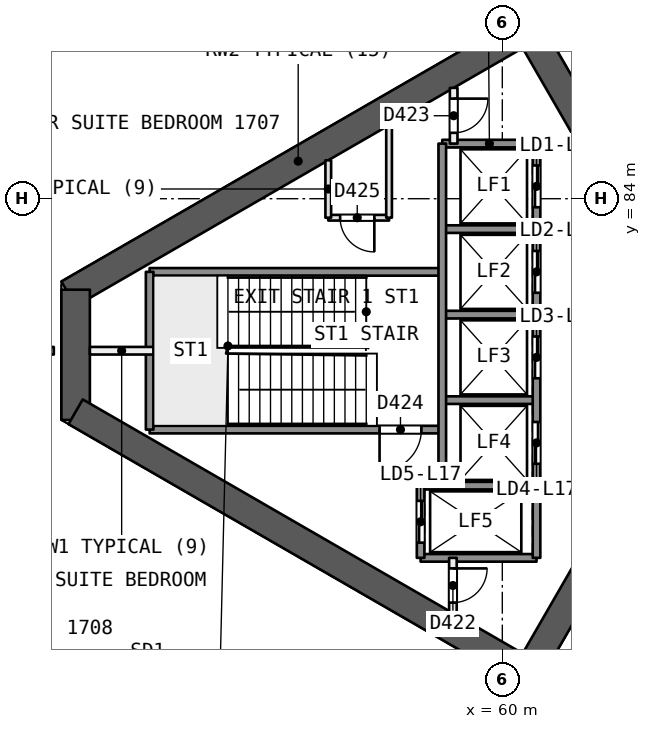
"""IFC4 building model, lengths in metres.
Left out: names, types, materials, properties, quantities, classifications, styles, units other than length and angle.
Written with IfcOpenShell. Run it as: python <this file> out.ifc"""

import sys

from ifc_helpers import new_model, si_unit, direction, frame, frame_2d, origin, place, context, subcontext, project, spatial, rectangle, extrude, element, fill, save


model = new_model("IFC4")
c1 = context("Model", 3, precision=1e-05, world=origin(), true_north=direction((0.0, 1.0)))
c2 = subcontext(c1, "Body", "Model", "MODEL_VIEW")
j1 = project(units=[si_unit("LENGTHUNIT", "METRE"), si_unit("PLANEANGLEUNIT", "RADIAN")], contexts=[c1])
p1 = place(None, origin())
s1 = spatial("IfcSite", under=j1, at=p1, CompositionType="ELEMENT")
p2 = place(p1, origin())
s2 = spatial("IfcBuilding", under=s1, at=p2, CompositionType="ELEMENT")
p3 = place(p2, frame((0.0, 0.0, 75.8)))
s3 = spatial("IfcBuildingStorey", under=s2, at=p3, CompositionType="ELEMENT", Elevation=75.8)
p4 = place(p3, frame((65.567, 80.0, 0.0), z_axis=(0.0, 0.0, 1.0), x_axis=(-0.499988615364, 0.866031976607, 0.0)))
e1 = element("IfcWall", 1, at=p4, inside=s3, PredefinedType="SHEAR", context=c2, shape_type="SweptSolid", body=[
    extrude(rectangle(XDim=10.163, YDim=0.75, at=frame_2d((5.082, 0.0))), origin(), (0.0, 0.0, 1.0), 3.7),
])
p5 = place(p4, frame((0.733, 0.0, 0.0)))
e2 = element("IfcOpeningElement", 2, at=p5, cuts=e1, PredefinedType="OPENING", context=c2, shape_type="SweptSolid", body=[
    extrude(rectangle(XDim=1.2, YDim=2.1, at=frame_2d((0.6, 1.05))), frame((0.0, 0.385, 0.0), z_axis=(0.0, -1.0, 0.0), x_axis=(1.0, 0.0, 0.0)), (0.0, 0.0, 1.0), 0.771),
])
p6 = place(p3, frame((60.673, 88.477, 0.0), z_axis=(0.0, 0.0, 1.0), x_axis=(-0.8660248072, -0.500001033313, 0.0)))
e3 = element("IfcWall", 3, at=p6, inside=s3, PredefinedType="SHEAR", context=c2, shape_type="SweptSolid", body=[
    extrude(rectangle(XDim=13.958, YDim=0.75, at=frame_2d((6.979, 0.0))), origin(), (0.0, 0.0, 1.0), 3.7),
])
p7 = place(p3, frame((48.772, 81.606, 0.0), z_axis=(0.0, 0.0, 1.0), x_axis=(0.0, -1.0, 0.0)))
e4 = element("IfcWall", 4, at=p7, inside=s3, PredefinedType="SHEAR", context=c2, shape_type="SweptSolid", body=[
    extrude(rectangle(XDim=3.429, YDim=0.75, at=frame_2d((1.714, 0.0))), origin(), (0.0, 0.0, 1.0), 3.7),
])
p8 = place(p3, frame((48.772, 78.394, 0.0), z_axis=(0.0, 0.0, 1.0), x_axis=(0.866028339916, -0.499994914436, 0.0)))
e5 = element("IfcWall", 5, at=p8, inside=s3, PredefinedType="SHEAR", context=c2, shape_type="SweptSolid", body=[
    extrude(rectangle(XDim=14.117, YDim=0.75, at=frame_2d((7.059, 0.0))), origin(), (0.0, 0.0, 1.0), 3.7),
])
p9 = place(p3, frame((60.673, 71.523, 0.0), z_axis=(0.0, 0.0, 1.0), x_axis=(0.499997052475, 0.866027105532, 0.0)))
e6 = element("IfcWall", 6, at=p9, inside=s3, PredefinedType="SHEAR", context=c2, shape_type="SweptSolid", body=[
    extrude(rectangle(XDim=10.005, YDim=0.75, at=frame_2d((5.002, 0.0))), origin(), (0.0, 0.0, 1.0), 3.7),
])
p10 = place(p9, frame((7.855, 0.0, 0.0)))
e7 = element("IfcOpeningElement", 7, at=p10, cuts=e6, PredefinedType="OPENING", context=c2, shape_type="SweptSolid", body=[
    extrude(rectangle(XDim=1.2, YDim=2.1, at=frame_2d((0.6, 1.05))), frame((0.0, 0.385, 0.0), z_axis=(0.0, -1.0, 0.0), x_axis=(1.0, 0.0, 0.0)), (0.0, 0.0, 1.0), 0.771),
])
p11 = place(p3, frame((61.547, 95.819, 0.0), z_axis=(0.0, 0.0, 1.0), x_axis=(0.499993103482, -0.866029385454, 0.0)))
e8 = element("IfcWall", 8, at=p11, inside=s3, PredefinedType="PARTITIONING", context=c2, shape_type="SweptSolid", body=[
    extrude(rectangle(XDim=13.326, YDim=0.2, at=frame_2d((6.663, 0.0))), origin(), (0.0, 0.0, 1.0), 3.2),
])
p12 = place(p3, frame((39.241, 80.0, 0.0), z_axis=(0.0, 0.0, 1.0), x_axis=(1.0, 0.0, 0.0)))
e9 = element("IfcWall", 9, at=p12, inside=s3, PredefinedType="PARTITIONING", context=c2, shape_type="SweptSolid", body=[
    extrude(rectangle(XDim=8.957, YDim=0.2, at=frame_2d((4.478, 0.0))), origin(), (0.0, 0.0, 1.0), 3.2),
])
p13 = place(p3, frame((39.093, 83.027, 0.0), z_axis=(0.0, 0.0, 1.0), x_axis=(0.866024586246, 0.500001416016, 0.0)))
e10 = element("IfcWall", 10, at=p13, inside=s3, PredefinedType="SOLIDWALL", context=c2, shape_type="SweptSolid", body=[
    extrude(rectangle(XDim=59.166, YDim=0.3, at=frame_2d((29.583, 0.0))), origin(), (0.0, 0.0, 1.0), 3.2),
])
p14 = place(p13, frame((27.292, 0.0, 0.0)))
e11 = element("IfcOpeningElement", 11, at=p14, cuts=e10, PredefinedType="OPENING", context=c2, shape_type="SweptSolid", body=[
    extrude(rectangle(XDim=2.4, YDim=2.4, at=frame_2d((1.2, 1.2))), frame((0.0, 0.161, 0.0), z_axis=(0.0, -1.0, 0.0), x_axis=(1.0, 0.0, 0.0)), (0.0, 0.0, 1.0), 0.321),
])
p15 = place(p13, frame((22.615, 0.0, 0.0)))
e12 = element("IfcOpeningElement", 12, at=p15, cuts=e10, PredefinedType="OPENING", context=c2, shape_type="SweptSolid", body=[
    extrude(rectangle(XDim=2.4, YDim=2.4, at=frame_2d((1.2, 1.2))), frame((0.0, 0.161, 0.0), z_axis=(0.0, -1.0, 0.0), x_axis=(1.0, 0.0, 0.0)), (0.0, 0.0, 1.0), 0.321),
])
p16 = place(p13, frame((10.88, 0.0, 0.0)))
e13 = element("IfcOpeningElement", 13, at=p16, cuts=e10, PredefinedType="OPENING", context=c2, shape_type="SweptSolid", body=[
    extrude(rectangle(XDim=2.4, YDim=2.4, at=frame_2d((1.2, 1.2))), frame((0.0, 0.161, 0.0), z_axis=(0.0, -1.0, 0.0), x_axis=(1.0, 0.0, 0.0)), (0.0, 0.0, 1.0), 0.321),
])
p17 = place(p13, frame((43.998, 0.0, 0.0)))
e14 = element("IfcOpeningElement", 14, at=p17, cuts=e10, PredefinedType="OPENING", context=c2, shape_type="SweptSolid", body=[
    extrude(rectangle(XDim=2.4, YDim=2.4, at=frame_2d((1.2, 1.2))), frame((0.0, 0.161, 0.0), z_axis=(0.0, -1.0, 0.0), x_axis=(1.0, 0.0, 0.0)), (0.0, 0.0, 1.0), 0.321),
])
p18 = place(p3, frame((90.332, 47.39, 0.0), z_axis=(0.0, 0.0, 1.0), x_axis=(-0.866024586246, 0.500001416016, 0.0)))
e15 = element("IfcWall", 15, at=p18, inside=s3, PredefinedType="SOLIDWALL", context=c2, shape_type="SweptSolid", body=[
    extrude(rectangle(XDim=59.166, YDim=0.3, at=frame_2d((29.583, 0.0))), origin(), (0.0, 0.0, 1.0), 3.2),
])
p19 = place(p18, frame((28.695, 0.0, 0.0)))
e16 = element("IfcOpeningElement", 16, at=p19, cuts=e15, PredefinedType="OPENING", context=c2, shape_type="SweptSolid", body=[
    extrude(rectangle(XDim=2.4, YDim=2.4, at=frame_2d((1.2, 1.2))), frame((0.0, 0.161, 0.0), z_axis=(0.0, -1.0, 0.0), x_axis=(1.0, 0.0, 0.0)), (0.0, 0.0, 1.0), 0.321),
])
p20 = place(p18, frame((33.372, 0.0, 0.0)))
e17 = element("IfcOpeningElement", 17, at=p20, cuts=e15, PredefinedType="OPENING", context=c2, shape_type="SweptSolid", body=[
    extrude(rectangle(XDim=2.4, YDim=2.4, at=frame_2d((1.2, 1.2))), frame((0.0, 0.161, 0.0), z_axis=(0.0, -1.0, 0.0), x_axis=(1.0, 0.0, 0.0)), (0.0, 0.0, 1.0), 0.321),
])
p21 = place(p18, frame((45.903, 0.0, 0.0)))
e18 = element("IfcOpeningElement", 18, at=p21, cuts=e15, PredefinedType="OPENING", context=c2, shape_type="SweptSolid", body=[
    extrude(rectangle(XDim=2.4, YDim=2.4, at=frame_2d((1.2, 1.2))), frame((0.0, 0.161, 0.0), z_axis=(0.0, -1.0, 0.0), x_axis=(1.0, 0.0, 0.0)), (0.0, 0.0, 1.0), 0.321),
])
p22 = place(p18, frame((12.769, 0.0, 0.0)))
e19 = element("IfcOpeningElement", 19, at=p22, cuts=e15, PredefinedType="OPENING", context=c2, shape_type="SweptSolid", body=[
    extrude(rectangle(XDim=2.4, YDim=2.4, at=frame_2d((1.2, 1.2))), frame((0.0, 0.161, 0.0), z_axis=(0.0, -1.0, 0.0), x_axis=(1.0, 0.0, 0.0)), (0.0, 0.0, 1.0), 0.321),
])
p23 = place(p3, frame((60.9, 85.45, 0.0), z_axis=(0.0, 0.0, 1.0), x_axis=(-1.0, 0.0, 0.0)))
e20 = element("IfcWall", 20, at=p23, inside=s3, PredefinedType="SOLIDWALL", context=c2, shape_type="SweptSolid", body=[
    extrude(rectangle(XDim=2.48, YDim=0.2, at=frame_2d((1.24, 0.0))), origin(), (0.0, 0.0, 1.0), 3.2),
])
p24 = place(p3, frame((57.02, 83.5, 0.0), z_axis=(0.0, 0.0, 1.0), x_axis=(-1.0, 0.0, 0.0)))
e21 = element("IfcWall", 21, at=p24, inside=s3, PredefinedType="PARTITIONING", context=c2, shape_type="SweptSolid", body=[
    extrude(rectangle(XDim=1.6, YDim=0.15, at=frame_2d((0.8, 0.0))), origin(), (0.0, 0.0, 1.0), 3.2),
])
p25 = place(p24, frame((0.387, 0.0, 0.0)))
e22 = element("IfcOpeningElement", 22, at=p25, cuts=e21, PredefinedType="OPENING", context=c2, shape_type="SweptSolid", body=[
    extrude(rectangle(XDim=0.9, YDim=2.1, at=frame_2d((0.45, 1.05))), frame((0.0, 0.085, 0.0), z_axis=(0.0, -1.0, 0.0), x_axis=(1.0, 0.0, 0.0)), (0.0, 0.0, 1.0), 0.171),
])
p26 = place(p3, frame((60.9, 83.2, 0.0), z_axis=(0.0, 0.0, 1.0), x_axis=(-1.0, 0.0, 0.0)))
e23 = element("IfcWall", 23, at=p26, inside=s3, PredefinedType="SOLIDWALL", context=c2, shape_type="SweptSolid", body=[
    extrude(rectangle(XDim=2.48, YDim=0.2, at=frame_2d((1.24, 0.0))), origin(), (0.0, 0.0, 1.0), 3.2),
])
p27 = place(p3, frame((58.42, 82.075, 0.0), z_axis=(0.0, 0.0, 1.0), x_axis=(-1.0, 0.0, 0.0)))
e24 = element("IfcWall", 24, at=p27, inside=s3, PredefinedType="SOLIDWALL", context=c2, shape_type="SweptSolid", body=[
    extrude(rectangle(XDim=7.7, YDim=0.2, at=frame_2d((3.85, 0.0))), origin(), (0.0, 0.0, 1.0), 3.2),
])
p28 = place(p3, frame((60.9, 80.95, 0.0), z_axis=(0.0, 0.0, 1.0), x_axis=(-1.0, 0.0, 0.0)))
e25 = element("IfcWall", 25, at=p28, inside=s3, PredefinedType="SOLIDWALL", context=c2, shape_type="SweptSolid", body=[
    extrude(rectangle(XDim=2.48, YDim=0.2, at=frame_2d((1.24, 0.0))), origin(), (0.0, 0.0, 1.0), 3.2),
])
p29 = place(p3, frame((50.82, 80.0, 0.0), z_axis=(0.0, 0.0, 1.0), x_axis=(-1.0, 0.0, 0.0)))
e26 = element("IfcWall", 26, at=p29, inside=s3, PredefinedType="PARTITIONING", context=c2, shape_type="SweptSolid", body=[
    extrude(rectangle(XDim=1.673, YDim=0.2, at=frame_2d((0.836, 0.0))), origin(), (0.0, 0.0, 1.0), 3.2),
])
p30 = place(p3, frame((60.9, 78.7, 0.0), z_axis=(0.0, 0.0, 1.0), x_axis=(-1.0, 0.0, 0.0)))
e27 = element("IfcWall", 27, at=p30, inside=s3, PredefinedType="SOLIDWALL", context=c2, shape_type="SweptSolid", body=[
    extrude(rectangle(XDim=2.48, YDim=0.2, at=frame_2d((1.24, 0.0))), origin(), (0.0, 0.0, 1.0), 3.2),
])
p31 = place(p3, frame((58.42, 77.925, 0.0), z_axis=(0.0, 0.0, 1.0), x_axis=(-1.0, 0.0, 0.0)))
e28 = element("IfcWall", 28, at=p31, inside=s3, PredefinedType="SOLIDWALL", context=c2, shape_type="SweptSolid", body=[
    extrude(rectangle(XDim=7.7, YDim=0.2, at=frame_2d((3.85, 0.0))), origin(), (0.0, 0.0, 1.0), 3.2),
])
p32 = place(p31, frame((0.55, 0.0, 0.0)))
e29 = element("IfcOpeningElement", 29, at=p32, cuts=e28, PredefinedType="OPENING", context=c2, shape_type="SweptSolid", body=[
    extrude(rectangle(XDim=1.1, YDim=2.1, at=frame_2d((0.55, 1.05))), frame((0.0, 0.11, 0.0), z_axis=(0.0, -1.0, 0.0), x_axis=(1.0, 0.0, 0.0)), (0.0, 0.0, 1.0), 0.221),
])
for number, where, z_axis, x_axis in (
    (30, (60.9, 76.45, 0.0), (0.0, 0.0, 1.0), (-1.0, 0.0, 0.0)),
    (31, (60.9, 74.55, 0.0), (0.0, 0.0, 1.0), (-1.0, 0.0, 0.0)),
):
    element("IfcWall", number, at=place(p3, frame(where, z_axis=z_axis, x_axis=x_axis)), inside=s3, PredefinedType="SOLIDWALL", context=c2, shape_type="SweptSolid", body=[
        extrude(rectangle(XDim=3.05, YDim=0.2, at=frame_2d((1.525, 0.0))), origin(), (0.0, 0.0, 1.0), 3.2),
    ])
p33 = place(p3, frame((60.9, 85.45, 0.0), z_axis=(0.0, 0.0, 1.0), x_axis=(0.0, -1.0, 0.0)))
e32 = element("IfcWall", 32, at=p33, inside=s3, PredefinedType="SOLIDWALL", context=c2, shape_type="SweptSolid", body=[
    extrude(rectangle(XDim=10.9, YDim=0.2, at=frame_2d((5.45, 0.0))), origin(), (0.0, 0.0, 1.0), 3.2),
])
p34 = place(p33, frame((0.575, 0.0, 0.0)))
e33 = element("IfcOpeningElement", 33, at=p34, cuts=e32, PredefinedType="OPENING", context=c2, shape_type="SweptSolid", body=[
    extrude(rectangle(XDim=1.1, YDim=2.1, at=frame_2d((0.55, 1.05))), frame((0.0, 0.11, 0.0), z_axis=(0.0, -1.0, 0.0), x_axis=(1.0, 0.0, 0.0)), (0.0, 0.0, 1.0), 0.221),
])
p35 = place(p33, frame((2.825, 0.0, 0.0)))
e34 = element("IfcOpeningElement", 34, at=p35, cuts=e32, PredefinedType="OPENING", context=c2, shape_type="SweptSolid", body=[
    extrude(rectangle(XDim=1.1, YDim=2.1, at=frame_2d((0.55, 1.05))), frame((0.0, 0.11, 0.0), z_axis=(0.0, -1.0, 0.0), x_axis=(1.0, 0.0, 0.0)), (0.0, 0.0, 1.0), 0.221),
])
p36 = place(p33, frame((5.075, 0.0, 0.0)))
e35 = element("IfcOpeningElement", 35, at=p36, cuts=e32, PredefinedType="OPENING", context=c2, shape_type="SweptSolid", body=[
    extrude(rectangle(XDim=1.1, YDim=2.1, at=frame_2d((0.55, 1.05))), frame((0.0, 0.11, 0.0), z_axis=(0.0, -1.0, 0.0), x_axis=(1.0, 0.0, 0.0)), (0.0, 0.0, 1.0), 0.221),
])
p37 = place(p33, frame((7.325, 0.0, 0.0)))
e36 = element("IfcOpeningElement", 36, at=p37, cuts=e32, PredefinedType="OPENING", context=c2, shape_type="SweptSolid", body=[
    extrude(rectangle(XDim=1.1, YDim=2.1, at=frame_2d((0.55, 1.05))), frame((0.0, 0.11, 0.0), z_axis=(0.0, -1.0, 0.0), x_axis=(1.0, 0.0, 0.0)), (0.0, 0.0, 1.0), 0.221),
])
p38 = place(p3, frame((58.72, 86.917, 0.0), z_axis=(0.0, 0.0, 1.0), x_axis=(0.0, -1.0, 0.0)))
e37 = element("IfcWall", 37, at=p38, inside=s3, PredefinedType="PARTITIONING", context=c2, shape_type="SweptSolid", body=[
    extrude(rectangle(XDim=1.467, YDim=0.2, at=frame_2d((0.733, 0.0))), origin(), (0.0, 0.0, 1.0), 3.2),
])
p39 = place(p38, frame((0.283, 0.0, 0.0)))
e38 = element("IfcOpeningElement", 38, at=p39, cuts=e37, PredefinedType="OPENING", context=c2, shape_type="SweptSolid", body=[
    extrude(rectangle(XDim=0.9, YDim=2.1, at=frame_2d((0.45, 1.05))), frame((0.0, 0.11, 0.0), z_axis=(0.0, -1.0, 0.0), x_axis=(1.0, 0.0, 0.0)), (0.0, 0.0, 1.0), 0.221),
])
p40 = place(p3, frame((58.7, 74.55, 0.0), z_axis=(0.0, 0.0, 1.0), x_axis=(0.0, -1.0, 0.0)))
e39 = element("IfcWall", 39, at=p40, inside=s3, PredefinedType="PARTITIONING", context=c2, shape_type="SweptSolid", body=[
    extrude(rectangle(XDim=1.455, YDim=0.2, at=frame_2d((0.728, 0.0))), origin(), (0.0, 0.0, 1.0), 3.2),
])
p41 = place(p40, frame((0.278, 0.0, 0.0)))
e40 = element("IfcOpeningElement", 40, at=p41, cuts=e39, PredefinedType="OPENING", context=c2, shape_type="SweptSolid", body=[
    extrude(rectangle(XDim=0.9, YDim=2.1, at=frame_2d((0.45, 1.05))), frame((0.0, 0.11, 0.0), z_axis=(0.0, -1.0, 0.0), x_axis=(1.0, 0.0, 0.0)), (0.0, 0.0, 1.0), 0.221),
])
p42 = place(p3, frame((58.42, 85.45, 0.0), z_axis=(0.0, 0.0, 1.0), x_axis=(0.0, -1.0, 0.0)))
e41 = element("IfcWall", 41, at=p42, inside=s3, PredefinedType="SOLIDWALL", context=c2, shape_type="SweptSolid", body=[
    extrude(rectangle(XDim=9.0, YDim=0.2, at=frame_2d((4.5, 0.0))), origin(), (0.0, 0.0, 1.0), 3.2),
])
p43 = place(p3, frame((57.85, 76.45, 0.0), z_axis=(0.0, 0.0, 1.0), x_axis=(0.0, -1.0, 0.0)))
e42 = element("IfcWall", 42, at=p43, inside=s3, PredefinedType="SOLIDWALL", context=c2, shape_type="SweptSolid", body=[
    extrude(rectangle(XDim=1.9, YDim=0.2, at=frame_2d((0.95, 0.0))), origin(), (0.0, 0.0, 1.0), 3.2),
])
p44 = place(p43, frame((0.4, 0.0, 0.0)))
e43 = element("IfcOpeningElement", 43, at=p44, cuts=e42, PredefinedType="OPENING", context=c2, shape_type="SweptSolid", body=[
    extrude(rectangle(XDim=1.1, YDim=2.1, at=frame_2d((0.55, 1.05))), frame((0.0, 0.11, 0.0), z_axis=(0.0, -1.0, 0.0), x_axis=(1.0, 0.0, 0.0)), (0.0, 0.0, 1.0), 0.221),
])
p45 = place(p3, frame((57.02, 85.935, 0.0), z_axis=(0.0, 0.0, 1.0), x_axis=(0.0, -1.0, 0.0)))
e44 = element("IfcWall", 44, at=p45, inside=s3, PredefinedType="PARTITIONING", context=c2, shape_type="SweptSolid", body=[
    extrude(rectangle(XDim=2.435, YDim=0.15, at=frame_2d((1.218, 0.0))), origin(), (0.0, 0.0, 1.0), 3.2),
])
p46 = place(p3, frame((55.42, 85.011, 0.0), z_axis=(0.0, 0.0, 1.0), x_axis=(0.0, -1.0, 0.0)))
e45 = element("IfcWall", 45, at=p46, inside=s3, PredefinedType="PARTITIONING", context=c2, shape_type="SweptSolid", body=[
    extrude(rectangle(XDim=1.511, YDim=0.15, at=frame_2d((0.756, 0.0))), origin(), (0.0, 0.0, 1.0), 3.2),
])
p47 = place(p3, frame((50.72, 82.075, 0.0), z_axis=(0.0, 0.0, 1.0), x_axis=(0.0, -1.0, 0.0)))
e46 = element("IfcWall", 46, at=p47, inside=s3, PredefinedType="SOLIDWALL", context=c2, shape_type="SweptSolid", body=[
    extrude(rectangle(XDim=4.15, YDim=0.2, at=frame_2d((2.075, 0.0))), origin(), (0.0, 0.0, 1.0), 3.2),
])
p48 = place(p34, origin())
e47 = element("IfcDoor", 47, at=p48, inside=s3, OperationType="SLIDING_TO_RIGHT", PredefinedType="NOTDEFINED", context=c2, shape_type="SweptSolid", body=[
    extrude(rectangle(XDim=1.1, YDim=2.1, at=frame_2d((0.55, 1.05))), frame((0.0, 0.025, 0.0), z_axis=(0.0, -1.0, 0.0), x_axis=(1.0, 0.0, 0.0)), (0.0, 0.0, 1.0), 0.05),
])
fill(e33, e47)
p49 = place(p35, origin())
e48 = element("IfcDoor", 48, at=p49, inside=s3, OperationType="SLIDING_TO_LEFT", PredefinedType="NOTDEFINED", context=c2, shape_type="SweptSolid", body=[
    extrude(rectangle(XDim=1.1, YDim=2.1, at=frame_2d((0.55, 1.05))), frame((0.0, 0.025, 0.0), z_axis=(0.0, -1.0, 0.0), x_axis=(1.0, 0.0, 0.0)), (0.0, 0.0, 1.0), 0.05),
])
fill(e34, e48)
p50 = place(p36, origin())
e49 = element("IfcDoor", 49, at=p50, inside=s3, OperationType="SLIDING_TO_RIGHT", PredefinedType="NOTDEFINED", context=c2, shape_type="SweptSolid", body=[
    extrude(rectangle(XDim=1.1, YDim=2.1, at=frame_2d((0.55, 1.05))), frame((0.0, 0.025, 0.0), z_axis=(0.0, -1.0, 0.0), x_axis=(1.0, 0.0, 0.0)), (0.0, 0.0, 1.0), 0.05),
])
fill(e35, e49)
p51 = place(p37, origin())
e50 = element("IfcDoor", 50, at=p51, inside=s3, OperationType="SLIDING_TO_LEFT", PredefinedType="NOTDEFINED", context=c2, shape_type="SweptSolid", body=[
    extrude(rectangle(XDim=1.1, YDim=2.1, at=frame_2d((0.55, 1.05))), frame((0.0, 0.025, 0.0), z_axis=(0.0, -1.0, 0.0), x_axis=(1.0, 0.0, 0.0)), (0.0, 0.0, 1.0), 0.05),
])
fill(e36, e50)
p52 = place(p44, origin())
e51 = element("IfcDoor", 51, at=p52, inside=s3, OperationType="SLIDING_TO_RIGHT", PredefinedType="NOTDEFINED", context=c2, shape_type="SweptSolid", body=[
    extrude(rectangle(XDim=1.1, YDim=2.1, at=frame_2d((0.55, 1.05))), frame((0.0, 0.025, 0.0), z_axis=(0.0, -1.0, 0.0), x_axis=(1.0, 0.0, 0.0)), (0.0, 0.0, 1.0), 0.05),
])
fill(e43, e51)
p53 = place(p41, origin())
e52 = element("IfcDoor", 52, at=p53, inside=s3, OperationType="SINGLE_SWING_LEFT", PredefinedType="NOTDEFINED", context=c2, shape_type="SweptSolid", body=[
    extrude(rectangle(XDim=0.9, YDim=2.1, at=frame_2d((0.45, 1.05))), frame((0.0, 0.025, 0.0), z_axis=(0.0, -1.0, 0.0), x_axis=(1.0, 0.0, 0.0)), (0.0, 0.0, 1.0), 0.05),
])
fill(e40, e52)
p54 = place(p39, origin())
e53 = element("IfcDoor", 53, at=p54, inside=s3, OperationType="SINGLE_SWING_LEFT", PredefinedType="NOTDEFINED", context=c2, shape_type="SweptSolid", body=[
    extrude(rectangle(XDim=0.9, YDim=2.1, at=frame_2d((0.45, 1.05))), frame((0.0, 0.025, 0.0), z_axis=(0.0, -1.0, 0.0), x_axis=(1.0, 0.0, 0.0)), (0.0, 0.0, 1.0), 0.05),
])
fill(e38, e53)
p55 = place(p32, origin())
e54 = element("IfcDoor", 54, at=p55, inside=s3, OperationType="SINGLE_SWING_RIGHT", PredefinedType="NOTDEFINED", context=c2, shape_type="SweptSolid", body=[
    extrude(rectangle(XDim=1.1, YDim=2.1, at=frame_2d((0.55, 1.05))), frame((0.0, 0.025, 0.0), z_axis=(0.0, -1.0, 0.0), x_axis=(1.0, 0.0, 0.0)), (0.0, 0.0, 1.0), 0.05),
])
fill(e29, e54)
p56 = place(p25, origin())
e55 = element("IfcDoor", 55, at=p56, inside=s3, OperationType="SINGLE_SWING_LEFT", PredefinedType="NOTDEFINED", context=c2, shape_type="SweptSolid", body=[
    extrude(rectangle(XDim=0.9, YDim=2.1, at=frame_2d((0.45, 1.05))), frame((0.0, 0.025, 0.0), z_axis=(0.0, -1.0, 0.0), x_axis=(1.0, 0.0, 0.0)), (0.0, 0.0, 1.0), 0.05),
])
fill(e22, e55)
save(model, sys.argv[1])
